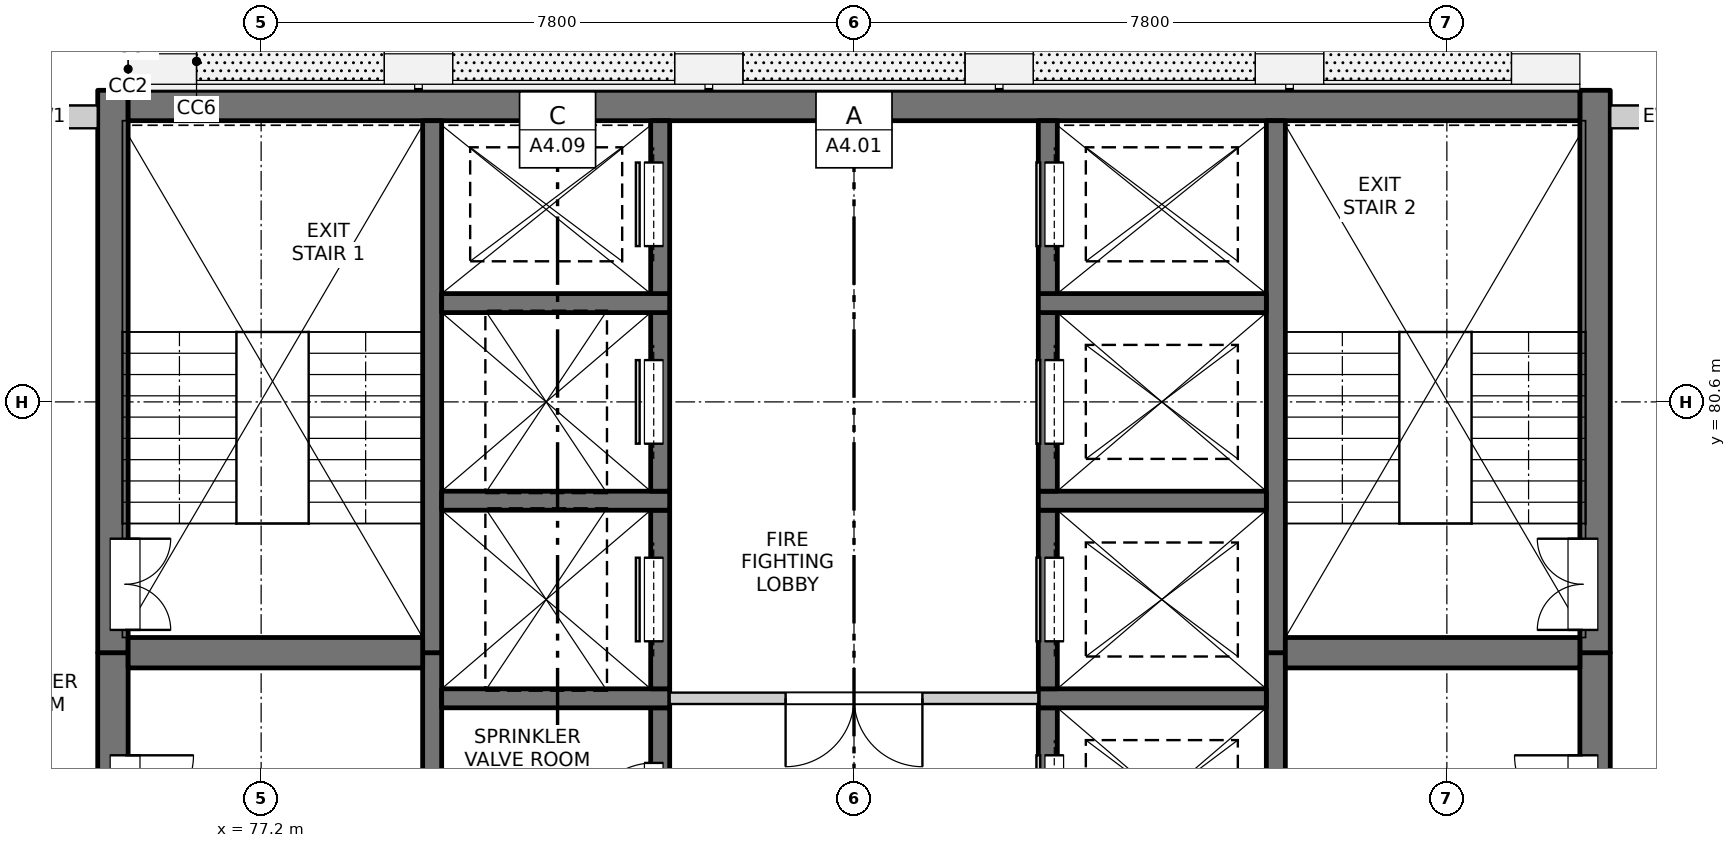
"""IFC4 building model, lengths in metres.
Left out: names, types, materials, properties, quantities, classifications, styles, units other than length and angle.
Written with IfcOpenShell. Run it as: python <this file> out.ifc"""

import sys

from ifc_helpers import new_model, si_unit, direction, frame, frame_2d, origin, place, context, subcontext, project, spatial, rectangle, extrude, element, fill, save


model = new_model("IFC4")
c1 = context("Model", 3, precision=1e-05, world=origin(), true_north=direction((0.0, 1.0)))
c2 = subcontext(c1, "Body", "Model", "MODEL_VIEW")
j1 = project(units=[si_unit("LENGTHUNIT", "METRE"), si_unit("PLANEANGLEUNIT", "RADIAN")], contexts=[c1])
p1 = place(None, origin())
s1 = spatial("IfcSite", under=j1, at=p1, CompositionType="ELEMENT")
p2 = place(p1, origin())
s2 = spatial("IfcBuilding", under=s1, at=p2, CompositionType="ELEMENT")
p3 = place(p2, frame((0.0, 0.0, 259.6)))
s3 = spatial("IfcBuildingStorey", under=s2, at=p3, CompositionType="ELEMENT", Elevation=259.6)
p4 = place(p3, frame((75.25, 55.05, -0.25), z_axis=(0.0, 0.0, 1.0), x_axis=(0.0, 1.0, 0.0)))
e1 = element("IfcWall", 1, at=p4, inside=s3, PredefinedType="SOLIDWALL", context=c2, shape_type="SweptSolid", body=[
    extrude(rectangle(XDim=22.25, YDim=0.4, at=frame_2d((11.125, 0.0))), origin(), (0.0, 0.0, 1.0), 3.4),
])
p5 = place(p4, frame((7.4, 0.0, 0.25)))
e2 = element("IfcOpeningElement", 2, at=p5, cuts=e1, PredefinedType="OPENING", context=c2, shape_type="SweptSolid", body=[
    extrude(rectangle(XDim=0.9, YDim=2.1, at=frame_2d((0.45, 1.05))), frame((0.0, 0.21, 0.0), z_axis=(0.0, -1.0, 0.0), x_axis=(1.0, 0.0, 0.0)), (0.0, 0.0, 1.0), 0.42),
])
p6 = place(p4, frame((10.7, 0.0, 0.25)))
e3 = element("IfcOpeningElement", 3, at=p6, cuts=e1, PredefinedType="OPENING", context=c2, shape_type="SweptSolid", body=[
    extrude(rectangle(XDim=0.9, YDim=2.1, at=frame_2d((0.45, 1.05))), frame((0.0, 0.21, 0.0), z_axis=(0.0, -1.0, 0.0), x_axis=(1.0, 0.0, 0.0)), (0.0, 0.0, 1.0), 0.42),
])
p7 = place(p4, frame((15.2, 0.0, 0.25)))
e4 = element("IfcOpeningElement", 4, at=p7, cuts=e1, PredefinedType="OPENING", context=c2, shape_type="SweptSolid", body=[
    extrude(rectangle(XDim=0.9, YDim=2.1, at=frame_2d((0.45, 1.05))), frame((0.0, 0.21, 0.0), z_axis=(0.0, -1.0, 0.0), x_axis=(1.0, 0.0, 0.0)), (0.0, 0.0, 1.0), 0.42),
])
p8 = place(p4, frame((20.0, 0.0, 0.25)))
e5 = element("IfcOpeningElement", 5, at=p8, cuts=e1, PredefinedType="OPENING", context=c2, shape_type="SweptSolid", body=[
    extrude(rectangle(XDim=0.9, YDim=2.1, at=frame_2d((0.45, 1.05))), frame((0.0, 0.21, 0.0), z_axis=(0.0, -1.0, 0.0), x_axis=(1.0, 0.0, 0.0)), (0.0, 0.0, 1.0), 0.42),
])
p9 = place(p3, frame((75.25, 77.3, -0.25), z_axis=(0.0, 0.0, 1.0), x_axis=(0.0, 1.0, 0.0)))
e6 = element("IfcWall", 6, at=p9, inside=s3, PredefinedType="SOLIDWALL", context=c2, shape_type="SweptSolid", body=[
    extrude(rectangle(XDim=7.4, YDim=0.4, at=frame_2d((3.7, 0.0))), origin(), (0.0, 0.0, 1.0), 3.4),
])
p10 = place(p9, frame((0.3, 0.0, 0.25)))
e7 = element("IfcOpeningElement", 7, at=p10, cuts=e6, PredefinedType="OPENING", context=c2, shape_type="SweptSolid", body=[
    extrude(rectangle(XDim=1.2, YDim=2.1, at=frame_2d((0.6, 1.05))), frame((0.0, 0.21, 0.0), z_axis=(0.0, -1.0, 0.0), x_axis=(1.0, 0.0, 0.0)), (0.0, 0.0, 1.0), 0.42),
])
p11 = place(p3, frame((94.75, 61.95, -0.25), z_axis=(0.0, 0.0, 1.0), x_axis=(0.0, 1.0, 0.0)))
e8 = element("IfcWall", 8, at=p11, inside=s3, PredefinedType="SOLIDWALL", context=c2, shape_type="SweptSolid", body=[
    extrude(rectangle(XDim=15.35, YDim=0.4, at=frame_2d((7.675, 0.0))), origin(), (0.0, 0.0, 1.0), 3.4),
])
p12 = place(p11, frame((0.925, 0.0, 0.25)))
e9 = element("IfcOpeningElement", 9, at=p12, cuts=e8, PredefinedType="OPENING", context=c2, shape_type="SweptSolid", body=[
    extrude(rectangle(XDim=0.9, YDim=2.1, at=frame_2d((0.45, 1.05))), frame((0.0, 0.21, 0.0), z_axis=(0.0, -1.0, 0.0), x_axis=(1.0, 0.0, 0.0)), (0.0, 0.0, 1.0), 0.42),
])
p13 = place(p11, frame((3.8, 0.0, 0.25)))
e10 = element("IfcOpeningElement", 10, at=p13, cuts=e8, PredefinedType="OPENING", context=c2, shape_type="SweptSolid", body=[
    extrude(rectangle(XDim=0.9, YDim=2.1, at=frame_2d((0.45, 1.05))), frame((0.0, 0.21, 0.0), z_axis=(0.0, -1.0, 0.0), x_axis=(1.0, 0.0, 0.0)), (0.0, 0.0, 1.0), 0.42),
])
p14 = place(p11, frame((8.3, 0.0, 0.25)))
e11 = element("IfcOpeningElement", 11, at=p14, cuts=e8, PredefinedType="OPENING", context=c2, shape_type="SweptSolid", body=[
    extrude(rectangle(XDim=0.9, YDim=2.1, at=frame_2d((0.45, 1.05))), frame((0.0, 0.21, 0.0), z_axis=(0.0, -1.0, 0.0), x_axis=(1.0, 0.0, 0.0)), (0.0, 0.0, 1.0), 0.42),
])
p15 = place(p11, frame((13.1, 0.0, 0.25)))
e12 = element("IfcOpeningElement", 12, at=p15, cuts=e8, PredefinedType="OPENING", context=c2, shape_type="SweptSolid", body=[
    extrude(rectangle(XDim=0.9, YDim=2.1, at=frame_2d((0.45, 1.05))), frame((0.0, 0.21, 0.0), z_axis=(0.0, -1.0, 0.0), x_axis=(1.0, 0.0, 0.0)), (0.0, 0.0, 1.0), 0.42),
])
p16 = place(p3, frame((94.75, 77.3, -0.25), z_axis=(0.0, 0.0, 1.0), x_axis=(0.0, 1.0, 0.0)))
e13 = element("IfcWall", 13, at=p16, inside=s3, PredefinedType="SOLIDWALL", context=c2, shape_type="SweptSolid", body=[
    extrude(rectangle(XDim=7.4, YDim=0.4, at=frame_2d((3.7, 0.0))), origin(), (0.0, 0.0, 1.0), 3.4),
])
p17 = place(p16, frame((0.3, 0.0, 0.25)))
e14 = element("IfcOpeningElement", 14, at=p17, cuts=e13, PredefinedType="OPENING", context=c2, shape_type="SweptSolid", body=[
    extrude(rectangle(XDim=1.2, YDim=2.1, at=frame_2d((0.6, 1.05))), frame((0.0, 0.21, 0.0), z_axis=(0.0, -1.0, 0.0), x_axis=(1.0, 0.0, 0.0)), (0.0, 0.0, 1.0), 0.42),
])
p18 = place(p3, frame((75.45, 84.5, -0.25), z_axis=(0.0, 0.0, 1.0), x_axis=(1.0, 0.0, 0.0)))
e15 = element("IfcWall", 15, at=p18, inside=s3, PredefinedType="SOLIDWALL", context=c2, shape_type="SweptSolid", body=[
    extrude(rectangle(XDim=19.1, YDim=0.4, at=frame_2d((9.55, 0.0))), origin(), (0.0, 0.0, 1.0), 3.4),
])
p19 = place(p3, frame((79.45, 60.975, -0.25), z_axis=(0.0, 0.0, 1.0), x_axis=(0.0, 1.0, 0.0)))
e16 = element("IfcWall", 16, at=p19, inside=s3, PredefinedType="SOLIDWALL", context=c2, shape_type="SweptSolid", body=[
    extrude(rectangle(XDim=16.325, YDim=0.25, at=frame_2d((8.163, 0.0))), origin(), (0.0, 0.0, 1.0), 3.4),
])
p20 = place(p3, frame((79.45, 77.3, -0.25), z_axis=(0.0, 0.0, 1.0), x_axis=(0.0, 1.0, 0.0)))
e17 = element("IfcWall", 17, at=p20, inside=s3, PredefinedType="SOLIDWALL", context=c2, shape_type="SweptSolid", body=[
    extrude(rectangle(XDim=7.0, YDim=0.25, at=frame_2d((3.5, 0.0))), origin(), (0.0, 0.0, 1.0), 3.4),
])
p21 = place(p3, frame((90.55, 61.95, -0.25), z_axis=(0.0, 0.0, 1.0), x_axis=(0.0, 1.0, 0.0)))
e18 = element("IfcWall", 18, at=p21, inside=s3, PredefinedType="SOLIDWALL", context=c2, shape_type="SweptSolid", body=[
    extrude(rectangle(XDim=15.35, YDim=0.25, at=frame_2d((7.675, 0.0))), origin(), (0.0, 0.0, 1.0), 3.4),
])
p22 = place(p3, frame((90.55, 77.3, -0.25), z_axis=(0.0, 0.0, 1.0), x_axis=(0.0, 1.0, 0.0)))
e19 = element("IfcWall", 19, at=p22, inside=s3, PredefinedType="SOLIDWALL", context=c2, shape_type="SweptSolid", body=[
    extrude(rectangle(XDim=7.0, YDim=0.25, at=frame_2d((3.5, 0.0))), origin(), (0.0, 0.0, 1.0), 3.4),
])
p23 = place(p3, frame((82.45, 74.225, -0.25), z_axis=(0.0, 0.0, 1.0), x_axis=(0.0, 1.0, 0.0)))
e20 = element("IfcWall", 20, at=p23, inside=s3, PredefinedType="SOLIDWALL", context=c2, shape_type="SweptSolid", body=[
    extrude(rectangle(XDim=2.35, YDim=0.25, at=frame_2d((1.175, 0.0))), origin(), (0.0, 0.0, 1.0), 3.4),
])
p24 = place(p23, frame((0.725, 0.0, 0.25)))
e21 = element("IfcOpeningElement", 21, at=p24, cuts=e20, PredefinedType="OPENING", context=c2, shape_type="SweptSolid", body=[
    extrude(rectangle(XDim=0.9, YDim=2.1, at=frame_2d((0.45, 1.05))), frame((0.0, 0.135, 0.0), z_axis=(0.0, -1.0, 0.0), x_axis=(1.0, 0.0, 0.0)), (0.0, 0.0, 1.0), 0.27),
])
p25 = place(p3, frame((79.575, 76.7, -0.25), z_axis=(0.0, 0.0, 1.0), x_axis=(1.0, 0.0, 0.0)))
e22 = element("IfcWall", 22, at=p25, inside=s3, PredefinedType="SOLIDWALL", context=c2, shape_type="SweptSolid", body=[
    extrude(rectangle(XDim=3.0, YDim=0.25, at=frame_2d((1.5, 0.0))), origin(), (0.0, 0.0, 1.0), 3.4),
])
p26 = place(p3, frame((82.45, 76.825, -0.25), z_axis=(0.0, 0.0, 1.0), x_axis=(0.0, 1.0, 0.0)))
e23 = element("IfcWall", 23, at=p26, inside=s3, PredefinedType="SOLIDWALL", context=c2, shape_type="SweptSolid", body=[
    extrude(rectangle(XDim=2.35, YDim=0.25, at=frame_2d((1.175, 0.0))), origin(), (0.0, 0.0, 1.0), 3.4),
])
p27 = place(p26, frame((0.625, 0.0, 0.25)))
e24 = element("IfcOpeningElement", 24, at=p27, cuts=e23, PredefinedType="OPENING", context=c2, shape_type="SweptSolid", body=[
    extrude(rectangle(XDim=1.1, YDim=2.1, at=frame_2d((0.55, 1.05))), frame((0.0, 0.135, 0.0), z_axis=(0.0, -1.0, 0.0), x_axis=(1.0, 0.0, 0.0)), (0.0, 0.0, 1.0), 0.27),
])
p28 = place(p3, frame((79.575, 79.3, -0.25), z_axis=(0.0, 0.0, 1.0), x_axis=(1.0, 0.0, 0.0)))
e25 = element("IfcWall", 25, at=p28, inside=s3, PredefinedType="SOLIDWALL", context=c2, shape_type="SweptSolid", body=[
    extrude(rectangle(XDim=3.0, YDim=0.25, at=frame_2d((1.5, 0.0))), origin(), (0.0, 0.0, 1.0), 3.4),
])
p29 = place(p3, frame((82.45, 79.425, -0.25), z_axis=(0.0, 0.0, 1.0), x_axis=(0.0, 1.0, 0.0)))
e26 = element("IfcWall", 26, at=p29, inside=s3, PredefinedType="SOLIDWALL", context=c2, shape_type="SweptSolid", body=[
    extrude(rectangle(XDim=2.35, YDim=0.25, at=frame_2d((1.175, 0.0))), origin(), (0.0, 0.0, 1.0), 3.4),
])
p30 = place(p29, frame((0.625, 0.0, 0.25)))
e27 = element("IfcOpeningElement", 27, at=p30, cuts=e26, PredefinedType="OPENING", context=c2, shape_type="SweptSolid", body=[
    extrude(rectangle(XDim=1.1, YDim=2.1, at=frame_2d((0.55, 1.05))), frame((0.0, 0.135, 0.0), z_axis=(0.0, -1.0, 0.0), x_axis=(1.0, 0.0, 0.0)), (0.0, 0.0, 1.0), 0.27),
])
p31 = place(p3, frame((79.575, 81.9, -0.25), z_axis=(0.0, 0.0, 1.0), x_axis=(1.0, 0.0, 0.0)))
e28 = element("IfcWall", 28, at=p31, inside=s3, PredefinedType="SOLIDWALL", context=c2, shape_type="SweptSolid", body=[
    extrude(rectangle(XDim=3.0, YDim=0.25, at=frame_2d((1.5, 0.0))), origin(), (0.0, 0.0, 1.0), 3.4),
])
p32 = place(p3, frame((82.45, 82.025, -0.25), z_axis=(0.0, 0.0, 1.0), x_axis=(0.0, 1.0, 0.0)))
e29 = element("IfcWall", 29, at=p32, inside=s3, PredefinedType="SOLIDWALL", context=c2, shape_type="SweptSolid", body=[
    extrude(rectangle(XDim=2.275, YDim=0.25, at=frame_2d((1.138, 0.0))), origin(), (0.0, 0.0, 1.0), 3.4),
])
p33 = place(p32, frame((0.625, 0.0, 0.25)))
e30 = element("IfcOpeningElement", 30, at=p33, cuts=e29, PredefinedType="OPENING", context=c2, shape_type="SweptSolid", body=[
    extrude(rectangle(XDim=1.1, YDim=2.1, at=frame_2d((0.55, 1.05))), frame((0.0, 0.135, 0.0), z_axis=(0.0, -1.0, 0.0), x_axis=(1.0, 0.0, 0.0)), (0.0, 0.0, 1.0), 0.27),
])
p34 = place(p3, frame((87.55, 74.225, -0.25), z_axis=(0.0, 0.0, 1.0), x_axis=(0.0, 1.0, 0.0)))
e31 = element("IfcWall", 31, at=p34, inside=s3, PredefinedType="SOLIDWALL", context=c2, shape_type="SweptSolid", body=[
    extrude(rectangle(XDim=2.35, YDim=0.25, at=frame_2d((1.175, 0.0))), origin(), (0.0, 0.0, 1.0), 3.4),
])
p35 = place(p34, frame((0.625, 0.0, 0.25)))
e32 = element("IfcOpeningElement", 32, at=p35, cuts=e31, PredefinedType="OPENING", context=c2, shape_type="SweptSolid", body=[
    extrude(rectangle(XDim=1.1, YDim=2.1, at=frame_2d((0.55, 1.05))), frame((0.0, 0.135, 0.0), z_axis=(0.0, -1.0, 0.0), x_axis=(1.0, 0.0, 0.0)), (0.0, 0.0, 1.0), 0.27),
])
p36 = place(p3, frame((87.425, 76.7, -0.25), z_axis=(0.0, 0.0, 1.0), x_axis=(1.0, 0.0, 0.0)))
e33 = element("IfcWall", 33, at=p36, inside=s3, PredefinedType="SOLIDWALL", context=c2, shape_type="SweptSolid", body=[
    extrude(rectangle(XDim=3.0, YDim=0.25, at=frame_2d((1.5, 0.0))), origin(), (0.0, 0.0, 1.0), 3.4),
])
p37 = place(p3, frame((87.55, 76.825, -0.25), z_axis=(0.0, 0.0, 1.0), x_axis=(0.0, 1.0, 0.0)))
e34 = element("IfcWall", 34, at=p37, inside=s3, PredefinedType="SOLIDWALL", context=c2, shape_type="SweptSolid", body=[
    extrude(rectangle(XDim=2.35, YDim=0.25, at=frame_2d((1.175, 0.0))), origin(), (0.0, 0.0, 1.0), 3.4),
])
p38 = place(p37, frame((0.625, 0.0, 0.25)))
e35 = element("IfcOpeningElement", 35, at=p38, cuts=e34, PredefinedType="OPENING", context=c2, shape_type="SweptSolid", body=[
    extrude(rectangle(XDim=1.1, YDim=2.1, at=frame_2d((0.55, 1.05))), frame((0.0, 0.135, 0.0), z_axis=(0.0, -1.0, 0.0), x_axis=(1.0, 0.0, 0.0)), (0.0, 0.0, 1.0), 0.27),
])
p39 = place(p3, frame((87.425, 79.3, -0.25), z_axis=(0.0, 0.0, 1.0), x_axis=(1.0, 0.0, 0.0)))
e36 = element("IfcWall", 36, at=p39, inside=s3, PredefinedType="SOLIDWALL", context=c2, shape_type="SweptSolid", body=[
    extrude(rectangle(XDim=3.0, YDim=0.25, at=frame_2d((1.5, 0.0))), origin(), (0.0, 0.0, 1.0), 3.4),
])
p40 = place(p3, frame((87.55, 79.425, -0.25), z_axis=(0.0, 0.0, 1.0), x_axis=(0.0, 1.0, 0.0)))
e37 = element("IfcWall", 37, at=p40, inside=s3, PredefinedType="SOLIDWALL", context=c2, shape_type="SweptSolid", body=[
    extrude(rectangle(XDim=2.35, YDim=0.25, at=frame_2d((1.175, 0.0))), origin(), (0.0, 0.0, 1.0), 3.4),
])
p41 = place(p40, frame((0.625, 0.0, 0.25)))
e38 = element("IfcOpeningElement", 38, at=p41, cuts=e37, PredefinedType="OPENING", context=c2, shape_type="SweptSolid", body=[
    extrude(rectangle(XDim=1.1, YDim=2.1, at=frame_2d((0.55, 1.05))), frame((0.0, 0.135, 0.0), z_axis=(0.0, -1.0, 0.0), x_axis=(1.0, 0.0, 0.0)), (0.0, 0.0, 1.0), 0.27),
])
p42 = place(p3, frame((87.425, 81.9, -0.25), z_axis=(0.0, 0.0, 1.0), x_axis=(1.0, 0.0, 0.0)))
e39 = element("IfcWall", 39, at=p42, inside=s3, PredefinedType="SOLIDWALL", context=c2, shape_type="SweptSolid", body=[
    extrude(rectangle(XDim=3.0, YDim=0.25, at=frame_2d((1.5, 0.0))), origin(), (0.0, 0.0, 1.0), 3.4),
])
p43 = place(p3, frame((87.55, 82.025, -0.25), z_axis=(0.0, 0.0, 1.0), x_axis=(0.0, 1.0, 0.0)))
e40 = element("IfcWall", 40, at=p43, inside=s3, PredefinedType="SOLIDWALL", context=c2, shape_type="SweptSolid", body=[
    extrude(rectangle(XDim=2.275, YDim=0.25, at=frame_2d((1.138, 0.0))), origin(), (0.0, 0.0, 1.0), 3.4),
])
p44 = place(p43, frame((0.625, 0.0, 0.25)))
e41 = element("IfcOpeningElement", 41, at=p44, cuts=e40, PredefinedType="OPENING", context=c2, shape_type="SweptSolid", body=[
    extrude(rectangle(XDim=1.1, YDim=2.1, at=frame_2d((0.55, 1.05))), frame((0.0, 0.135, 0.0), z_axis=(0.0, -1.0, 0.0), x_axis=(1.0, 0.0, 0.0)), (0.0, 0.0, 1.0), 0.27),
])
for number, where, z_axis, x_axis in (
    (42, (75.45, 77.3, -0.25), (0.0, 0.0, 1.0), (1.0, 0.0, 0.0)),
    (43, (90.675, 77.3, -0.25), (0.0, 0.0, 1.0), (1.0, 0.0, 0.0)),
):
    element("IfcWall", number, at=place(p3, frame(where, z_axis=z_axis, x_axis=x_axis)), inside=s3, PredefinedType="SOLIDWALL", context=c2, shape_type="SweptSolid", body=[
        extrude(rectangle(XDim=3.875, YDim=0.4, at=frame_2d((1.938, 0.0))), origin(), (0.0, 0.0, 1.0), 3.4),
    ])
for number, where, z_axis, x_axis in (
    (44, (73.625, 84.35, 0.0), (0.0, 0.0, 1.0), (1.0, 0.0, 0.0)),
    (45, (94.95, 84.35, 0.0), (0.0, 0.0, 1.0), (1.0, 0.0, 0.0)),
):
    element("IfcWall", number, at=place(p3, frame(where, z_axis=z_axis, x_axis=x_axis)), inside=s3, PredefinedType="SOLIDWALL", context=c2, shape_type="SweptSolid", body=[
        extrude(rectangle(XDim=1.425, YDim=0.3, at=frame_2d((0.712, 0.0))), origin(), (0.0, 0.0, 1.0), 3.15),
    ])
p45 = place(p3, frame((82.575, 76.7, 0.0), z_axis=(0.0, 0.0, 1.0), x_axis=(1.0, 0.0, 0.0)))
e46 = element("IfcWall", 46, at=p45, inside=s3, PredefinedType="PARTITIONING", context=c2, shape_type="SweptSolid", body=[
    extrude(rectangle(XDim=4.85, YDim=0.15, at=frame_2d((2.425, 0.0))), origin(), (0.0, 0.0, 1.0), 3.15),
])
p46 = place(p45, frame((1.525, 0.0, 0.0)))
e47 = element("IfcOpeningElement", 47, at=p46, cuts=e46, PredefinedType="OPENING", context=c2, shape_type="SweptSolid", body=[
    extrude(rectangle(XDim=1.8, YDim=2.1, at=frame_2d((0.9, 1.05))), frame((0.0, 0.085, 0.0), z_axis=(0.0, -1.0, 0.0), x_axis=(1.0, 0.0, 0.0)), (0.0, 0.0, 1.0), 0.17),
])
p47 = place(p24, origin())
e48 = element("IfcDoor", 48, at=p47, inside=s3, OperationType="SINGLE_SWING_LEFT", PredefinedType="DOOR", context=c2, shape_type="SweptSolid", body=[
    extrude(rectangle(XDim=0.9, YDim=2.1, at=frame_2d((0.45, 1.05))), frame((0.0, 0.11, 0.0), z_axis=(0.0, -1.0, 0.0), x_axis=(1.0, 0.0, 0.0)), (0.0, 0.0, 1.0), 0.05),
])
fill(e21, e48)
p48 = place(p35, origin())
e49 = element("IfcDoor", 49, at=p48, inside=s3, OperationType="SLIDING_TO_LEFT", PredefinedType="DOOR", context=c2, shape_type="SweptSolid", body=[
    extrude(rectangle(XDim=1.1, YDim=2.1, at=frame_2d((0.55, 1.05))), frame((0.0, -0.06, 0.0), z_axis=(0.0, -1.0, 0.0), x_axis=(1.0, 0.0, 0.0)), (0.0, 0.0, 1.0), 0.05),
])
fill(e32, e49)
p49 = place(p8, origin())
e50 = element("IfcDoor", 50, at=p49, inside=s3, OperationType="SINGLE_SWING_LEFT", PredefinedType="DOOR", context=c2, shape_type="SweptSolid", body=[
    extrude(rectangle(XDim=0.9, YDim=2.1, at=frame_2d((0.45, 1.05))), frame((0.0, -0.135, 0.0), z_axis=(0.0, -1.0, 0.0), x_axis=(1.0, 0.0, 0.0)), (0.0, 0.0, 1.0), 0.05),
])
fill(e5, e50)
p50 = place(p15, origin())
e51 = element("IfcDoor", 51, at=p50, inside=s3, OperationType="SINGLE_SWING_RIGHT", PredefinedType="DOOR", context=c2, shape_type="SweptSolid", body=[
    extrude(rectangle(XDim=0.9, YDim=2.1, at=frame_2d((0.45, 1.05))), frame((0.0, 0.185, 0.0), z_axis=(0.0, -1.0, 0.0), x_axis=(1.0, 0.0, 0.0)), (0.0, 0.0, 1.0), 0.05),
])
fill(e12, e51)
p51 = place(p46, origin())
e52 = element("IfcDoor", 52, at=p51, inside=s3, OperationType="DOUBLE_DOOR_SINGLE_SWING", PredefinedType="DOOR", context=c2, shape_type="SweptSolid", body=[
    extrude(rectangle(XDim=1.8, YDim=2.1, at=frame_2d((0.9, 1.05))), frame((0.0, 0.025, 0.0), z_axis=(0.0, -1.0, 0.0), x_axis=(1.0, 0.0, 0.0)), (0.0, 0.0, 1.0), 0.05),
])
fill(e47, e52)
p52 = place(p27, origin())
e53 = element("IfcDoor", 53, at=p52, inside=s3, OperationType="SLIDING_TO_LEFT", PredefinedType="DOOR", context=c2, shape_type="SweptSolid", body=[
    extrude(rectangle(XDim=1.1, YDim=2.1, at=frame_2d((0.55, 1.05))), frame((0.0, 0.11, 0.0), z_axis=(0.0, -1.0, 0.0), x_axis=(1.0, 0.0, 0.0)), (0.0, 0.0, 1.0), 0.05),
])
fill(e24, e53)
p53 = place(p38, origin())
e54 = element("IfcDoor", 54, at=p53, inside=s3, OperationType="SLIDING_TO_LEFT", PredefinedType="DOOR", context=c2, shape_type="SweptSolid", body=[
    extrude(rectangle(XDim=1.1, YDim=2.1, at=frame_2d((0.55, 1.05))), frame((0.0, -0.06, 0.0), z_axis=(0.0, -1.0, 0.0), x_axis=(1.0, 0.0, 0.0)), (0.0, 0.0, 1.0), 0.05),
])
fill(e35, e54)
p54 = place(p10, origin())
e55 = element("IfcDoor", 55, at=p54, inside=s3, OperationType="DOUBLE_DOOR_SINGLE_SWING", PredefinedType="DOOR", context=c2, shape_type="SweptSolid", body=[
    extrude(rectangle(XDim=1.2, YDim=2.1, at=frame_2d((0.6, 1.05))), frame((0.0, -0.135, 0.0), z_axis=(0.0, -1.0, 0.0), x_axis=(1.0, 0.0, 0.0)), (0.0, 0.0, 1.0), 0.05),
])
fill(e7, e55)
p55 = place(p17, origin())
e56 = element("IfcDoor", 56, at=p55, inside=s3, OperationType="DOUBLE_DOOR_SINGLE_SWING", PredefinedType="DOOR", context=c2, shape_type="SweptSolid", body=[
    extrude(rectangle(XDim=1.2, YDim=2.1, at=frame_2d((0.6, 1.05))), frame((0.0, 0.185, 0.0), z_axis=(0.0, -1.0, 0.0), x_axis=(1.0, 0.0, 0.0)), (0.0, 0.0, 1.0), 0.05),
])
fill(e14, e56)
p56 = place(p30, origin())
e57 = element("IfcDoor", 57, at=p56, inside=s3, OperationType="SLIDING_TO_LEFT", PredefinedType="DOOR", context=c2, shape_type="SweptSolid", body=[
    extrude(rectangle(XDim=1.1, YDim=2.1, at=frame_2d((0.55, 1.05))), frame((0.0, 0.11, 0.0), z_axis=(0.0, -1.0, 0.0), x_axis=(1.0, 0.0, 0.0)), (0.0, 0.0, 1.0), 0.05),
])
fill(e27, e57)
p57 = place(p41, origin())
e58 = element("IfcDoor", 58, at=p57, inside=s3, OperationType="SLIDING_TO_RIGHT", PredefinedType="DOOR", context=c2, shape_type="SweptSolid", body=[
    extrude(rectangle(XDim=1.1, YDim=2.1, at=frame_2d((0.55, 1.05))), frame((0.0, -0.06, 0.0), z_axis=(0.0, -1.0, 0.0), x_axis=(1.0, 0.0, 0.0)), (0.0, 0.0, 1.0), 0.05),
])
fill(e38, e58)
p58 = place(p33, origin())
e59 = element("IfcDoor", 59, at=p58, inside=s3, OperationType="SLIDING_TO_RIGHT", PredefinedType="DOOR", context=c2, shape_type="SweptSolid", body=[
    extrude(rectangle(XDim=1.1, YDim=2.1, at=frame_2d((0.55, 1.05))), frame((0.0, 0.11, 0.0), z_axis=(0.0, -1.0, 0.0), x_axis=(1.0, 0.0, 0.0)), (0.0, 0.0, 1.0), 0.05),
])
fill(e30, e59)
p59 = place(p44, origin())
e60 = element("IfcDoor", 60, at=p59, inside=s3, OperationType="SLIDING_TO_RIGHT", PredefinedType="DOOR", context=c2, shape_type="SweptSolid", body=[
    extrude(rectangle(XDim=1.1, YDim=2.1, at=frame_2d((0.55, 1.05))), frame((0.0, -0.06, 0.0), z_axis=(0.0, -1.0, 0.0), x_axis=(1.0, 0.0, 0.0)), (0.0, 0.0, 1.0), 0.05),
])
fill(e41, e60)
save(model, sys.argv[1])
